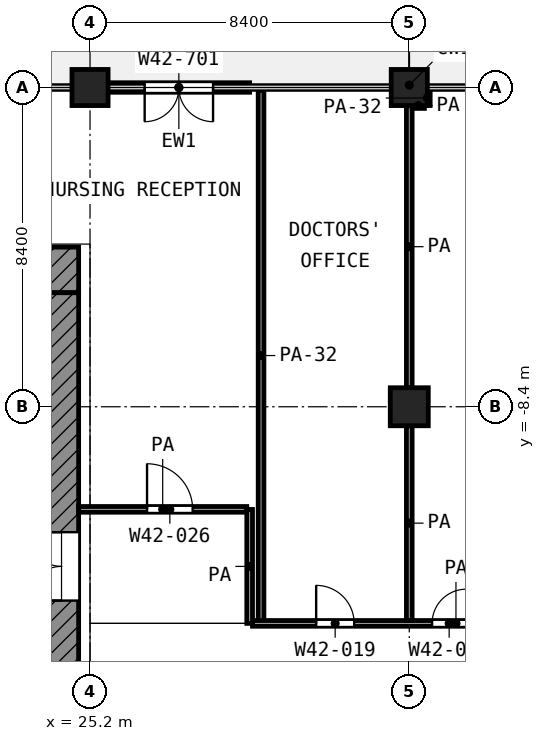
"""IFC4 building model, lengths in metres.
Left out: names, types, materials, properties, quantities, classifications, styles, units other than length and angle.
Written with IfcOpenShell. Run it as: python <this file> out.ifc"""

import sys

from ifc_helpers import new_model, si_unit, direction, frame, frame_2d, origin, origin_2d, place, context, subcontext, project, spatial, rectangle, extrude, element, fill, save


model = new_model("IFC4")
c1 = context("Model", 3, precision=1e-05, world=origin(), true_north=direction((0.0, 1.0)))
c2 = subcontext(c1, "Body", "Model", "MODEL_VIEW")
j1 = project(units=[si_unit("LENGTHUNIT", "METRE"), si_unit("PLANEANGLEUNIT", "RADIAN")], contexts=[c1])
p1 = place(None, origin())
s1 = spatial("IfcSite", under=j1, at=p1, CompositionType="ELEMENT")
p2 = place(p1, origin())
s2 = spatial("IfcBuilding", under=s1, at=p2, CompositionType="ELEMENT")
p3 = place(p2, frame((0.0, 0.0, 183.6)))
s3 = spatial("IfcBuildingStorey", under=s2, at=p3, CompositionType="ELEMENT", Elevation=183.6)
for number, where, z_axis, x_axis in (
    (1, (25.2, 0.0, 0.0), (0.0, 0.0, 1.0), (1.0, 0.0, 0.0)),
    (2, (33.6, 0.0, 0.0), (0.0, 0.0, 1.0), (1.0, 0.0, 0.0)),
):
    element("IfcColumn", number, at=place(p3, frame(where, z_axis=z_axis, x_axis=x_axis)), inside=s3, PredefinedType="COLUMN", context=c2, shape_type="SweptSolid", body=[
        extrude(rectangle(XDim=0.95, YDim=0.95, at=origin_2d()), origin(), (0.0, 0.0, 1.0), 4.2),
    ])
p4 = place(p3, frame((33.6, -8.4, 0.0), z_axis=(0.0, 0.0, 1.0), x_axis=(1.0, 0.0, 0.0)))
e3 = element("IfcColumn", 3, at=p4, inside=s3, PredefinedType="COLUMN", context=c2, shape_type="SweptSolid", body=[
    extrude(rectangle(XDim=1.0, YDim=1.0, at=origin_2d()), origin(), (0.0, 0.0, 1.0), 4.2),
])
p5 = place(p3, frame((29.4, 0.0, 0.0), z_axis=(0.0, 0.0, 1.0), x_axis=(-1.0, 0.0, 0.0)))
e4 = element("IfcWall", 4, at=p5, inside=s3, PredefinedType="SOLIDWALL", context=c2, shape_type="SweptSolid", body=[
    extrude(rectangle(XDim=3.725, YDim=0.25, at=frame_2d((1.862, 0.0))), origin(), (0.0, 0.0, 1.0), 2.58),
])
p6 = place(p5, frame((0.962, 0.0, 0.0)))
e5 = element("IfcOpeningElement", 5, at=p6, cuts=e4, PredefinedType="OPENING", context=c2, shape_type="SweptSolid", body=[
    extrude(rectangle(XDim=1.8, YDim=2.1, at=frame_2d((0.9, 1.05))), frame((0.0, 0.135, 0.0), z_axis=(0.0, -1.0, 0.0), x_axis=(1.0, 0.0, 0.0)), (0.0, 0.0, 1.0), 0.27),
])
p7 = place(p3, frame((4.2, -4.8, 0.0), z_axis=(0.0, 0.0, 1.0), x_axis=(1.0, 0.0, 0.0)))
e6 = element("IfcWall", 6, at=p7, inside=s3, PredefinedType="SHEAR", context=c2, shape_type="SweptSolid", body=[
    extrude(rectangle(XDim=20.7, YDim=1.2, at=frame_2d((10.35, 0.0))), origin(), (0.0, 0.0, 1.0), 3.6),
])
p8 = place(p7, frame((1.95, 0.0, 0.0)))
e7 = element("IfcOpeningElement", 7, at=p8, cuts=e6, PredefinedType="OPENING", context=c2, shape_type="SweptSolid", body=[
    extrude(rectangle(XDim=1.1, YDim=2.1, at=frame_2d((0.55, 1.05))), frame((0.0, 0.61, 0.0), z_axis=(0.0, -1.0, 0.0), x_axis=(1.0, 0.0, 0.0)), (0.0, 0.0, 1.0), 1.22),
])
p9 = place(p7, frame((17.95, 0.0, 0.0)))
e8 = element("IfcOpeningElement", 8, at=p9, cuts=e6, PredefinedType="OPENING", context=c2, shape_type="SweptSolid", body=[
    extrude(rectangle(XDim=1.1, YDim=2.1, at=frame_2d((0.55, 1.05))), frame((0.0, 0.61, 0.0), z_axis=(0.0, -1.0, 0.0), x_axis=(1.0, 0.0, 0.0)), (0.0, 0.0, 1.0), 1.22),
])
p10 = place(p3, frame((24.45, -24.0, 0.0), z_axis=(0.0, 0.0, 1.0), x_axis=(0.0, 1.0, 0.0)))
e9 = element("IfcWall", 9, at=p10, inside=s3, PredefinedType="SHEAR", context=c2, shape_type="SweptSolid", body=[
    extrude(rectangle(XDim=18.6, YDim=0.9, at=frame_2d((9.3, 0.0))), origin(), (0.0, 0.0, 1.0), 3.6),
])
p11 = place(p10, frame((10.5, 0.0, 0.0)))
e10 = element("IfcOpeningElement", 10, at=p11, cuts=e9, PredefinedType="OPENING", context=c2, shape_type="SweptSolid", body=[
    extrude(rectangle(XDim=1.8, YDim=2.1, at=frame_2d((0.9, 1.05))), frame((0.0, 0.46, 0.0), z_axis=(0.0, -1.0, 0.0), x_axis=(1.0, 0.0, 0.0)), (0.0, 0.0, 1.0), 0.92),
])
p12 = place(p3, frame((29.475, -14.1, 0.0), z_axis=(0.0, 0.0, 1.0), x_axis=(1.0, 0.0, 0.0)))
e11 = element("IfcWall", 11, at=p12, inside=s3, PredefinedType="PARTITIONING", context=c2, shape_type="SweptSolid", body=[
    extrude(rectangle(XDim=10.707, YDim=0.15, at=frame_2d((5.354, 0.0))), origin(), (0.0, 0.0, 1.0), 3.6),
])
p13 = place(p12, frame((1.675, 0.0, 0.0)))
e12 = element("IfcOpeningElement", 12, at=p13, cuts=e11, PredefinedType="OPENING", context=c2, shape_type="SweptSolid", body=[
    extrude(rectangle(XDim=1.0, YDim=2.1, at=frame_2d((0.5, 1.05))), frame((0.0, 0.085, 0.0), z_axis=(0.0, -1.0, 0.0), x_axis=(1.0, 0.0, 0.0)), (0.0, 0.0, 1.0), 0.17),
])
p14 = place(p12, frame((4.725, 0.0, 0.0)))
e13 = element("IfcOpeningElement", 13, at=p14, cuts=e11, PredefinedType="OPENING", context=c2, shape_type="SweptSolid", body=[
    extrude(rectangle(XDim=0.9, YDim=2.1, at=frame_2d((0.45, 1.05))), frame((0.0, 0.085, 0.0), z_axis=(0.0, -1.0, 0.0), x_axis=(1.0, 0.0, 0.0)), (0.0, 0.0, 1.0), 0.17),
])
p15 = place(p12, frame((6.775, 0.0, 0.0)))
e14 = element("IfcOpeningElement", 14, at=p15, cuts=e11, PredefinedType="OPENING", context=c2, shape_type="SweptSolid", body=[
    extrude(rectangle(XDim=1.0, YDim=2.1, at=frame_2d((0.5, 1.05))), frame((0.0, 0.085, 0.0), z_axis=(0.0, -1.0, 0.0), x_axis=(1.0, 0.0, 0.0)), (0.0, 0.0, 1.0), 0.17),
])
p16 = place(p3, frame((24.9, -11.1, 0.0), z_axis=(0.0, 0.0, 1.0), x_axis=(1.0, 0.0, 0.0)))
e15 = element("IfcWall", 15, at=p16, inside=s3, PredefinedType="PARTITIONING", context=c2, shape_type="SweptSolid", body=[
    extrude(rectangle(XDim=4.424, YDim=0.15, at=frame_2d((2.212, 0.0))), origin(), (0.0, 0.0, 1.0), 3.6),
])
p17 = place(p16, frame((1.8, 0.0, 0.0)))
e16 = element("IfcOpeningElement", 16, at=p17, cuts=e15, PredefinedType="OPENING", context=c2, shape_type="SweptSolid", body=[
    extrude(rectangle(XDim=1.2, YDim=2.1, at=frame_2d((0.6, 1.05))), frame((0.0, 0.085, 0.0), z_axis=(0.0, -1.0, 0.0), x_axis=(1.0, 0.0, 0.0)), (0.0, 0.0, 1.0), 0.17),
])
p18 = place(p3, frame((33.677, -0.475, 0.0), z_axis=(0.0, 0.0, 1.0), x_axis=(1.0, 0.0, 0.0)))
e17 = element("IfcWall", 17, at=p18, inside=s3, PredefinedType="PARTITIONING", context=c2, shape_type="SweptSolid", body=[
    extrude(rectangle(XDim=0.321, YDim=0.15, at=frame_2d((0.161, 0.0))), origin(), (0.0, 0.0, 1.0), 3.6),
])
p19 = place(p3, frame((29.4, -14.1, 0.0), z_axis=(0.0, 0.0, 1.0), x_axis=(0.0, 1.0, 0.0)))
e18 = element("IfcWall", 18, at=p19, inside=s3, PredefinedType="PARTITIONING", context=c2, shape_type="SweptSolid", body=[
    extrude(rectangle(XDim=2.998, YDim=0.15, at=frame_2d((1.499, 0.0))), origin(), (0.0, 0.0, 1.0), 3.6),
])
p20 = place(p3, frame((29.7, -14.025, 0.0), z_axis=(0.0, 0.0, 1.0), x_axis=(0.0, 1.0, 0.0)))
e19 = element("IfcWall", 19, at=p20, inside=s3, PredefinedType="PARTITIONING", context=c2, shape_type="SweptSolid", body=[
    extrude(rectangle(XDim=13.945, YDim=0.15, at=frame_2d((6.972, 0.0))), origin(), (0.0, 0.0, 1.0), 2.7),
])
p21 = place(p3, frame((33.6, -14.025, 0.0), z_axis=(0.0, 0.0, 1.0), x_axis=(0.0, 1.0, 0.0)))
e20 = element("IfcWall", 20, at=p21, inside=s3, PredefinedType="PARTITIONING", context=c2, shape_type="SweptSolid", body=[
    extrude(rectangle(XDim=5.125, YDim=0.15, at=frame_2d((2.562, 0.0))), origin(), (0.0, 0.0, 1.0), 3.6),
])
p22 = place(p3, frame((33.6, -7.9, 0.0), z_axis=(0.0, 0.0, 1.0), x_axis=(0.0, 1.0, 0.0)))
e21 = element("IfcWall", 21, at=p22, inside=s3, PredefinedType="PARTITIONING", context=c2, shape_type="SweptSolid", body=[
    extrude(rectangle(XDim=7.423, YDim=0.15, at=frame_2d((3.711, 0.0))), origin(), (0.0, 0.0, 1.0), 3.6),
])
p23 = place(p3, frame((34.075, -0.473, 0.0), z_axis=(0.0, 0.0, 1.0), x_axis=(0.0, 1.0, 0.0)))
e22 = element("IfcWall", 22, at=p23, inside=s3, PredefinedType="PARTITIONING", context=c2, shape_type="SweptSolid", body=[
    extrude(rectangle(XDim=0.393, YDim=0.15, at=frame_2d((0.196, 0.0))), origin(), (0.0, 0.0, 1.0), 2.7),
])
p24 = place(p6, origin())
e23 = element("IfcDoor", 23, at=p24, inside=s3, OperationType="DOUBLE_DOOR_SINGLE_SWING", PredefinedType="DOOR", context=c2, shape_type="SweptSolid", body=[
    extrude(rectangle(XDim=1.8, YDim=2.1, at=frame_2d((0.9, 1.05))), frame((0.0, 0.025, 0.0), z_axis=(0.0, -1.0, 0.0), x_axis=(1.0, 0.0, 0.0)), (0.0, 0.0, 1.0), 0.05),
])
fill(e5, e23)
p25 = place(p11, origin())
e24 = element("IfcDoor", 24, at=p25, inside=s3, OperationType="DOUBLE_DOOR_SINGLE_SWING", PredefinedType="DOOR", context=c2, shape_type="SweptSolid", body=[
    extrude(rectangle(XDim=1.8, YDim=2.1, at=frame_2d((0.9, 1.05))), frame((0.0, 0.025, 0.0), z_axis=(0.0, -1.0, 0.0), x_axis=(1.0, 0.0, 0.0)), (0.0, 0.0, 1.0), 0.05),
])
fill(e10, e24)
p26 = place(p17, origin())
e25 = element("IfcDoor", 25, at=p26, inside=s3, OperationType="SINGLE_SWING_LEFT", PredefinedType="DOOR", context=c2, shape_type="SweptSolid", body=[
    extrude(rectangle(XDim=1.2, YDim=2.1, at=frame_2d((0.6, 1.05))), frame((0.0, 0.025, 0.0), z_axis=(0.0, -1.0, 0.0), x_axis=(1.0, 0.0, 0.0)), (0.0, 0.0, 1.0), 0.05),
])
fill(e16, e25)
p27 = place(p13, origin())
e26 = element("IfcDoor", 26, at=p27, inside=s3, OperationType="SINGLE_SWING_LEFT", PredefinedType="DOOR", context=c2, shape_type="SweptSolid", body=[
    extrude(rectangle(XDim=1.0, YDim=2.1, at=frame_2d((0.5, 1.05))), frame((0.0, 0.025, 0.0), z_axis=(0.0, -1.0, 0.0), x_axis=(1.0, 0.0, 0.0)), (0.0, 0.0, 1.0), 0.05),
])
fill(e12, e26)
p28 = place(p14, origin())
e27 = element("IfcDoor", 27, at=p28, inside=s3, OperationType="SINGLE_SWING_RIGHT", PredefinedType="DOOR", context=c2, shape_type="SweptSolid", body=[
    extrude(rectangle(XDim=0.9, YDim=2.1, at=frame_2d((0.45, 1.05))), frame((0.0, 0.025, 0.0), z_axis=(0.0, -1.0, 0.0), x_axis=(1.0, 0.0, 0.0)), (0.0, 0.0, 1.0), 0.05),
])
fill(e13, e27)
save(model, sys.argv[1])
